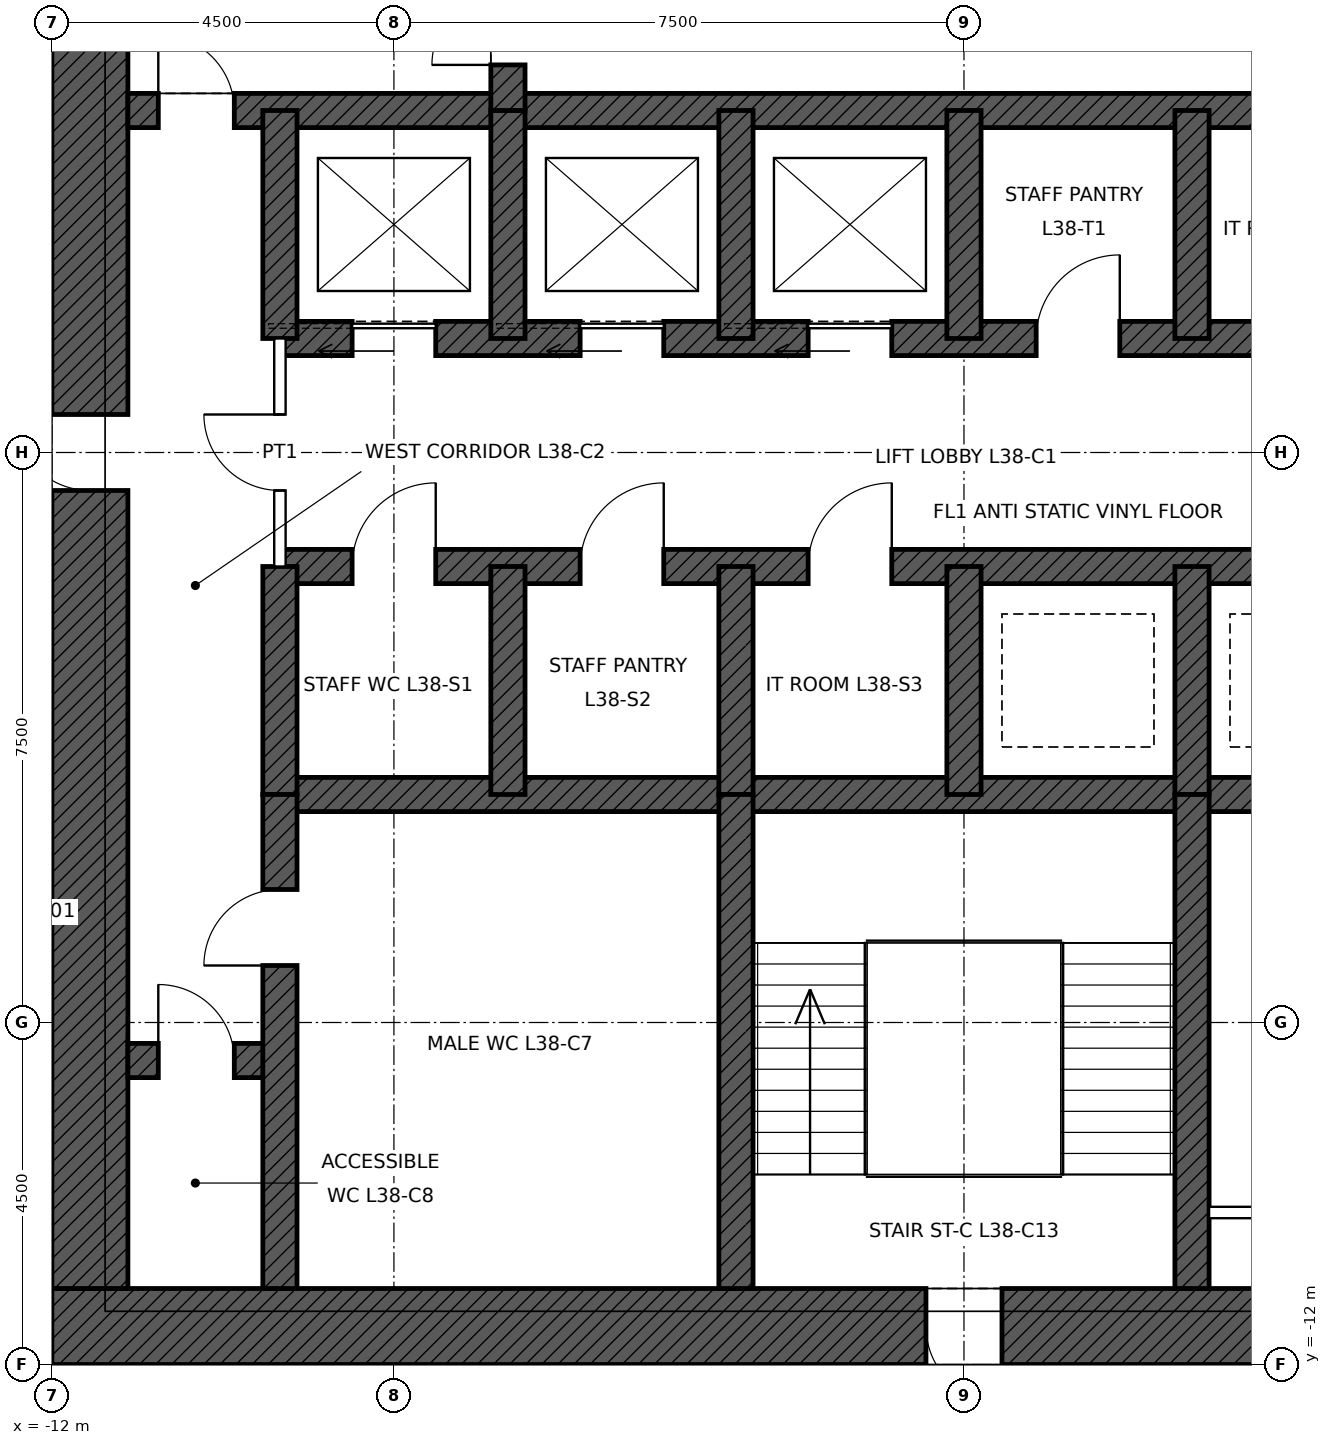
"""IFC4 building model, lengths in metres.
Left out: names, types, materials, properties, quantities, classifications, styles, units other than length and angle.
Written with IfcOpenShell. Run it as: python <this file> out.ifc"""

import sys

from ifc_helpers import new_model, si_unit, direction, frame, frame_2d, origin, place, context, subcontext, project, spatial, rectangle, extrude, element, fill, save


model = new_model("IFC4")
c1 = context("Model", 3, precision=1e-05, world=origin(), true_north=direction((0.0, 1.0)))
c2 = subcontext(c1, "Body", "Model", "MODEL_VIEW")
j1 = project(units=[si_unit("LENGTHUNIT", "METRE"), si_unit("PLANEANGLEUNIT", "RADIAN")], contexts=[c1])
p1 = place(None, origin())
s1 = spatial("IfcSite", under=j1, at=p1, CompositionType="ELEMENT")
p2 = place(p1, origin())
s2 = spatial("IfcBuilding", under=s1, at=p2, CompositionType="ELEMENT")
p3 = place(p2, frame((0.0, 0.0, 185.9)))
s3 = spatial("IfcBuildingStorey", under=s2, at=p3, CompositionType="ELEMENT", Elevation=185.9)
p4 = place(p3, frame((12.0, -11.5, 0.0), z_axis=(0.0, 0.0, 1.0), x_axis=(-1.0, 0.0, 0.0)))
e1 = element("IfcWall", 1, at=p4, inside=s3, PredefinedType="SHEAR", context=c2, shape_type="SweptSolid", body=[
    extrude(rectangle(XDim=24.0, YDim=1.0, at=frame_2d((12.0, 0.0))), origin(), (0.0, 0.0, 1.0), 4.0),
])
p5 = place(p4, frame((11.5, 0.0, 0.0)))
e2 = element("IfcOpeningElement", 2, at=p5, cuts=e1, PredefinedType="OPENING", context=c2, shape_type="SweptSolid", body=[
    extrude(rectangle(XDim=1.0, YDim=2.1, at=frame_2d((0.5, 1.05))), frame((0.0, 0.51, 0.0), z_axis=(0.0, -1.0, 0.0), x_axis=(1.0, 0.0, 0.0)), (0.0, 0.0, 1.0), 1.02),
])
p6 = place(p4, frame((1.0, 0.0, 0.0)))
e3 = element("IfcOpeningElement", 3, at=p6, cuts=e1, PredefinedType="OPENING", context=c2, shape_type="SweptSolid", body=[
    extrude(rectangle(XDim=1.0, YDim=2.4, at=frame_2d((0.5, 1.2))), frame((0.0, 0.51, 0.0), z_axis=(0.0, -1.0, 0.0), x_axis=(1.0, 0.0, 0.0)), (0.0, 0.0, 1.0), 1.02),
])
p7 = place(p3, frame((-11.5, -11.0, 0.0), z_axis=(0.0, 0.0, 1.0), x_axis=(0.0, 1.0, 0.0)))
e4 = element("IfcWall", 4, at=p7, inside=s3, PredefinedType="SHEAR", context=c2, shape_type="SweptSolid", body=[
    extrude(rectangle(XDim=22.0, YDim=1.0, at=frame_2d((11.0, 0.0))), origin(), (0.0, 0.0, 1.0), 4.0),
])
p8 = place(p7, frame((10.5, 0.0, 0.0)))
e5 = element("IfcOpeningElement", 5, at=p8, cuts=e4, PredefinedType="OPENING", context=c2, shape_type="SweptSolid", body=[
    extrude(rectangle(XDim=1.0, YDim=2.4, at=frame_2d((0.5, 1.2))), frame((0.0, 0.51, 0.0), z_axis=(0.0, -1.0, 0.0), x_axis=(1.0, 0.0, 0.0)), (0.0, 0.0, 1.0), 1.02),
])
p9 = place(p3, frame((-11.0, 4.5, 0.0), z_axis=(0.0, 0.0, 1.0), x_axis=(1.0, 0.0, 0.0)))
e6 = element("IfcWall", 6, at=p9, inside=s3, PredefinedType="SHEAR", context=c2, shape_type="SweptSolid", body=[
    extrude(rectangle(XDim=22.0, YDim=0.45, at=frame_2d((11.0, 0.0))), origin(), (0.0, 0.0, 1.0), 4.0),
])
p10 = place(p9, frame((0.4, 0.0, 0.0)))
e7 = element("IfcOpeningElement", 7, at=p10, cuts=e6, PredefinedType="OPENING", context=c2, shape_type="SweptSolid", body=[
    extrude(rectangle(XDim=1.0, YDim=2.1, at=frame_2d((0.5, 1.05))), frame((0.0, 0.235, 0.0), z_axis=(0.0, -1.0, 0.0), x_axis=(1.0, 0.0, 0.0)), (0.0, 0.0, 1.0), 0.47),
])
p11 = place(p9, frame((20.6, 0.0, 0.0)))
e8 = element("IfcOpeningElement", 8, at=p11, cuts=e6, PredefinedType="OPENING", context=c2, shape_type="SweptSolid", body=[
    extrude(rectangle(XDim=1.0, YDim=2.1, at=frame_2d((0.5, 1.05))), frame((0.0, 0.235, 0.0), z_axis=(0.0, -1.0, 0.0), x_axis=(1.0, 0.0, 0.0)), (0.0, 0.0, 1.0), 0.47),
])
p12 = place(p3, frame((-9.0, 1.5, 0.0), z_axis=(0.0, 0.0, 1.0), x_axis=(1.0, 0.0, 0.0)))
e9 = element("IfcWall", 9, at=p12, inside=s3, PredefinedType="SHEAR", context=c2, shape_type="SweptSolid", body=[
    extrude(rectangle(XDim=18.0, YDim=0.45, at=frame_2d((9.0, 0.0))), origin(), (0.0, 0.0, 1.0), 4.0),
])
p13 = place(p12, frame((0.95, 0.0, 0.0)))
e10 = element("IfcOpeningElement", 10, at=p13, cuts=e9, PredefinedType="OPENING", context=c2, shape_type="SweptSolid", body=[
    extrude(rectangle(XDim=1.1, YDim=2.1, at=frame_2d((0.55, 1.05))), frame((0.0, 0.235, 0.0), z_axis=(0.0, -1.0, 0.0), x_axis=(1.0, 0.0, 0.0)), (0.0, 0.0, 1.0), 0.47),
])
p14 = place(p12, frame((3.95, 0.0, 0.0)))
e11 = element("IfcOpeningElement", 11, at=p14, cuts=e9, PredefinedType="OPENING", context=c2, shape_type="SweptSolid", body=[
    extrude(rectangle(XDim=1.1, YDim=2.1, at=frame_2d((0.55, 1.05))), frame((0.0, 0.235, 0.0), z_axis=(0.0, -1.0, 0.0), x_axis=(1.0, 0.0, 0.0)), (0.0, 0.0, 1.0), 0.47),
])
p15 = place(p12, frame((6.95, 0.0, 0.0)))
e12 = element("IfcOpeningElement", 12, at=p15, cuts=e9, PredefinedType="OPENING", context=c2, shape_type="SweptSolid", body=[
    extrude(rectangle(XDim=1.1, YDim=2.1, at=frame_2d((0.55, 1.05))), frame((0.0, 0.235, 0.0), z_axis=(0.0, -1.0, 0.0), x_axis=(1.0, 0.0, 0.0)), (0.0, 0.0, 1.0), 0.47),
])
p16 = place(p12, frame((9.95, 0.0, 0.0)))
e13 = element("IfcOpeningElement", 13, at=p16, cuts=e9, PredefinedType="OPENING", context=c2, shape_type="SweptSolid", body=[
    extrude(rectangle(XDim=1.1, YDim=2.1, at=frame_2d((0.55, 1.05))), frame((0.0, 0.235, 0.0), z_axis=(0.0, -1.0, 0.0), x_axis=(1.0, 0.0, 0.0)), (0.0, 0.0, 1.0), 0.47),
])
p17 = place(p12, frame((12.95, 0.0, 0.0)))
e14 = element("IfcOpeningElement", 14, at=p17, cuts=e9, PredefinedType="OPENING", context=c2, shape_type="SweptSolid", body=[
    extrude(rectangle(XDim=1.1, YDim=2.1, at=frame_2d((0.55, 1.05))), frame((0.0, 0.235, 0.0), z_axis=(0.0, -1.0, 0.0), x_axis=(1.0, 0.0, 0.0)), (0.0, 0.0, 1.0), 0.47),
])
p18 = place(p12, frame((15.95, 0.0, 0.0)))
e15 = element("IfcOpeningElement", 15, at=p18, cuts=e9, PredefinedType="OPENING", context=c2, shape_type="SweptSolid", body=[
    extrude(rectangle(XDim=1.1, YDim=2.1, at=frame_2d((0.55, 1.05))), frame((0.0, 0.235, 0.0), z_axis=(0.0, -1.0, 0.0), x_axis=(1.0, 0.0, 0.0)), (0.0, 0.0, 1.0), 0.47),
])
p19 = place(p3, frame((-9.0, -1.5, 0.0), z_axis=(0.0, 0.0, 1.0), x_axis=(1.0, 0.0, 0.0)))
e16 = element("IfcWall", 16, at=p19, inside=s3, PredefinedType="SHEAR", context=c2, shape_type="SweptSolid", body=[
    extrude(rectangle(XDim=18.0, YDim=0.45, at=frame_2d((9.0, 0.0))), origin(), (0.0, 0.0, 1.0), 4.0),
])
p20 = place(p19, frame((0.95, 0.0, 0.0)))
e17 = element("IfcOpeningElement", 17, at=p20, cuts=e16, PredefinedType="OPENING", context=c2, shape_type="SweptSolid", body=[
    extrude(rectangle(XDim=1.1, YDim=2.1, at=frame_2d((0.55, 1.05))), frame((0.0, 0.235, 0.0), z_axis=(0.0, -1.0, 0.0), x_axis=(1.0, 0.0, 0.0)), (0.0, 0.0, 1.0), 0.47),
])
p21 = place(p19, frame((3.95, 0.0, 0.0)))
e18 = element("IfcOpeningElement", 18, at=p21, cuts=e16, PredefinedType="OPENING", context=c2, shape_type="SweptSolid", body=[
    extrude(rectangle(XDim=1.1, YDim=2.1, at=frame_2d((0.55, 1.05))), frame((0.0, 0.235, 0.0), z_axis=(0.0, -1.0, 0.0), x_axis=(1.0, 0.0, 0.0)), (0.0, 0.0, 1.0), 0.47),
])
p22 = place(p19, frame((6.95, 0.0, 0.0)))
e19 = element("IfcOpeningElement", 19, at=p22, cuts=e16, PredefinedType="OPENING", context=c2, shape_type="SweptSolid", body=[
    extrude(rectangle(XDim=1.1, YDim=2.1, at=frame_2d((0.55, 1.05))), frame((0.0, 0.235, 0.0), z_axis=(0.0, -1.0, 0.0), x_axis=(1.0, 0.0, 0.0)), (0.0, 0.0, 1.0), 0.47),
])
p23 = place(p3, frame((-9.0, -4.5, 0.0), z_axis=(0.0, 0.0, 1.0), x_axis=(1.0, 0.0, 0.0)))
e20 = element("IfcWall", 20, at=p23, inside=s3, PredefinedType="SHEAR", context=c2, shape_type="SweptSolid", body=[
    extrude(rectangle(XDim=18.0, YDim=0.45, at=frame_2d((9.0, 0.0))), origin(), (0.0, 0.0, 1.0), 4.0),
])
p24 = place(p3, frame((-11.0, -8.0, 0.0), z_axis=(0.0, 0.0, 1.0), x_axis=(1.0, 0.0, 0.0)))
e21 = element("IfcWall", 21, at=p24, inside=s3, PredefinedType="SHEAR", context=c2, shape_type="SweptSolid", body=[
    extrude(rectangle(XDim=2.0, YDim=0.45, at=frame_2d((1.0, 0.0))), origin(), (0.0, 0.0, 1.0), 4.0),
])
p25 = place(p24, frame((0.4, 0.0, 0.0)))
e22 = element("IfcOpeningElement", 22, at=p25, cuts=e21, PredefinedType="OPENING", context=c2, shape_type="SweptSolid", body=[
    extrude(rectangle(XDim=1.0, YDim=2.1, at=frame_2d((0.5, 1.05))), frame((0.0, 0.235, 0.0), z_axis=(0.0, -1.0, 0.0), x_axis=(1.0, 0.0, 0.0)), (0.0, 0.0, 1.0), 0.47),
])
for number, where, z_axis, x_axis in (
    (23, (-9.0, 1.5, 0.0), (0.0, 0.0, 1.0), (0.0, 1.0, 0.0)),
    (24, (-9.0, -4.5, 0.0), (0.0, 0.0, 1.0), (0.0, 1.0, 0.0)),
    (25, (-6.0, 1.5, 0.0), (0.0, 0.0, 1.0), (0.0, 1.0, 0.0)),
    (26, (-3.0, 1.5, 0.0), (0.0, 0.0, 1.0), (0.0, 1.0, 0.0)),
    (27, (0.0, 1.5, 0.0), (0.0, 0.0, 1.0), (0.0, 1.0, 0.0)),
    (28, (3.0, 1.5, 0.0), (0.0, 0.0, 1.0), (0.0, 1.0, 0.0)),
    (29, (-6.0, -4.5, 0.0), (0.0, 0.0, 1.0), (0.0, 1.0, 0.0)),
    (30, (-3.0, -4.5, 0.0), (0.0, 0.0, 1.0), (0.0, 1.0, 0.0)),
    (31, (0.0, -4.5, 0.0), (0.0, 0.0, 1.0), (0.0, 1.0, 0.0)),
    (32, (3.0, -4.5, 0.0), (0.0, 0.0, 1.0), (0.0, 1.0, 0.0)),
):
    element("IfcWall", number, at=place(p3, frame(where, z_axis=z_axis, x_axis=x_axis)), inside=s3, PredefinedType="SHEAR", context=c2, shape_type="SweptSolid", body=[
        extrude(rectangle(XDim=3.0, YDim=0.45, at=frame_2d((1.5, 0.0))), origin(), (0.0, 0.0, 1.0), 4.0),
    ])
p26 = place(p3, frame((-6.0, 4.5, 0.0), z_axis=(0.0, 0.0, 1.0), x_axis=(0.0, 1.0, 0.0)))
e33 = element("IfcWall", 33, at=p26, inside=s3, PredefinedType="SHEAR", context=c2, shape_type="SweptSolid", body=[
    extrude(rectangle(XDim=6.5, YDim=0.45, at=frame_2d((3.25, 0.0))), origin(), (0.0, 0.0, 1.0), 4.0),
])
p27 = place(p26, frame((0.6, 0.0, 0.0)))
e34 = element("IfcOpeningElement", 34, at=p27, cuts=e33, PredefinedType="OPENING", context=c2, shape_type="SweptSolid", body=[
    extrude(rectangle(XDim=1.0, YDim=2.1, at=frame_2d((0.5, 1.05))), frame((0.0, 0.235, 0.0), z_axis=(0.0, -1.0, 0.0), x_axis=(1.0, 0.0, 0.0)), (0.0, 0.0, 1.0), 0.47),
])
p28 = place(p3, frame((-9.0, -11.0, 0.0), z_axis=(0.0, 0.0, 1.0), x_axis=(0.0, 1.0, 0.0)))
e35 = element("IfcWall", 35, at=p28, inside=s3, PredefinedType="SHEAR", context=c2, shape_type="SweptSolid", body=[
    extrude(rectangle(XDim=6.5, YDim=0.45, at=frame_2d((3.25, 0.0))), origin(), (0.0, 0.0, 1.0), 4.0),
])
p29 = place(p28, frame((4.25, 0.0, 0.0)))
e36 = element("IfcOpeningElement", 36, at=p29, cuts=e35, PredefinedType="OPENING", context=c2, shape_type="SweptSolid", body=[
    extrude(rectangle(XDim=1.0, YDim=2.1, at=frame_2d((0.5, 1.05))), frame((0.0, 0.235, 0.0), z_axis=(0.0, -1.0, 0.0), x_axis=(1.0, 0.0, 0.0)), (0.0, 0.0, 1.0), 0.47),
])
for number, where, z_axis, x_axis in (
    (37, (-3.0, -11.0, 0.0), (0.0, 0.0, 1.0), (0.0, 1.0, 0.0)),
    (38, (3.0, -11.0, 0.0), (0.0, 0.0, 1.0), (0.0, 1.0, 0.0)),
):
    element("IfcWall", number, at=place(p3, frame(where, z_axis=z_axis, x_axis=x_axis)), inside=s3, PredefinedType="SHEAR", context=c2, shape_type="SweptSolid", body=[
        extrude(rectangle(XDim=6.5, YDim=0.45, at=frame_2d((3.25, 0.0))), origin(), (0.0, 0.0, 1.0), 4.0),
    ])
p30 = place(p3, frame((3.225, -10.0, 0.0), z_axis=(0.0, 0.0, 1.0), x_axis=(1.0, 0.0, 0.0)))
e39 = element("IfcWall", 39, at=p30, inside=s3, PredefinedType="PARTITIONING", context=c2, shape_type="SweptSolid", body=[
    extrude(rectangle(XDim=5.55, YDim=0.15, at=frame_2d((2.775, 0.0))), origin(), (0.0, 0.0, 1.0), 3.75),
])
p31 = place(p30, frame((2.275, 0.0, 0.0)))
e40 = element("IfcOpeningElement", 40, at=p31, cuts=e39, PredefinedType="OPENING", context=c2, shape_type="SweptSolid", body=[
    extrude(rectangle(XDim=1.0, YDim=2.1, at=frame_2d((0.5, 1.05))), frame((0.0, 0.085, 0.0), z_axis=(0.0, -1.0, 0.0), x_axis=(1.0, 0.0, 0.0)), (0.0, 0.0, 1.0), 0.17),
])
p32 = place(p3, frame((-9.0, -1.5, 0.0), z_axis=(0.0, 0.0, 1.0), x_axis=(0.0, 1.0, 0.0)))
e41 = element("IfcWall", 41, at=p32, inside=s3, PredefinedType="PARTITIONING", context=c2, shape_type="SweptSolid", body=[
    extrude(rectangle(XDim=3.0, YDim=0.15, at=frame_2d((1.5, 0.0))), origin(), (0.0, 0.0, 1.0), 3.75),
])
p33 = place(p32, frame((1.0, 0.0, 0.0)))
e42 = element("IfcOpeningElement", 42, at=p33, cuts=e41, PredefinedType="OPENING", context=c2, shape_type="SweptSolid", body=[
    extrude(rectangle(XDim=1.0, YDim=2.4, at=frame_2d((0.5, 1.2))), frame((0.0, 0.085, 0.0), z_axis=(0.0, -1.0, 0.0), x_axis=(1.0, 0.0, 0.0)), (0.0, 0.0, 1.0), 0.17),
])
p34 = place(p10, origin())
e43 = element("IfcDoor", 43, at=p34, inside=s3, OperationType="SINGLE_SWING_LEFT", PredefinedType="DOOR", context=c2, shape_type="SweptSolid", body=[
    extrude(rectangle(XDim=1.0, YDim=2.1, at=frame_2d((0.5, 1.05))), frame((0.0, 0.025, 0.0), z_axis=(0.0, -1.0, 0.0), x_axis=(1.0, 0.0, 0.0)), (0.0, 0.0, 1.0), 0.05),
])
fill(e7, e43)
p35 = place(p27, origin())
e44 = element("IfcDoor", 44, at=p35, inside=s3, OperationType="SINGLE_SWING_LEFT", PredefinedType="DOOR", context=c2, shape_type="SweptSolid", body=[
    extrude(rectangle(XDim=1.0, YDim=2.1, at=frame_2d((0.5, 1.05))), frame((0.0, 0.025, 0.0), z_axis=(0.0, -1.0, 0.0), x_axis=(1.0, 0.0, 0.0)), (0.0, 0.0, 1.0), 0.05),
])
fill(e34, e44)
p36 = place(p5, origin())
e45 = element("IfcDoor", 45, at=p36, inside=s3, OperationType="SINGLE_SWING_LEFT", PredefinedType="DOOR", context=c2, shape_type="SweptSolid", body=[
    extrude(rectangle(XDim=1.0, YDim=2.1, at=frame_2d((0.5, 1.05))), frame((0.0, 0.485, 0.0), z_axis=(0.0, -1.0, 0.0), x_axis=(1.0, 0.0, 0.0)), (0.0, 0.0, 1.0), 0.05),
])
fill(e2, e45)
p37 = place(p8, origin())
e46 = element("IfcDoor", 46, at=p37, inside=s3, OperationType="SINGLE_SWING_RIGHT", PredefinedType="DOOR", context=c2, shape_type="SweptSolid", body=[
    extrude(rectangle(XDim=1.0, YDim=2.4, at=frame_2d((0.5, 1.2))), frame((0.0, 0.485, 0.0), z_axis=(0.0, -1.0, 0.0), x_axis=(1.0, 0.0, 0.0)), (0.0, 0.0, 1.0), 0.05),
])
fill(e5, e46)
p38 = place(p29, origin())
e47 = element("IfcDoor", 47, at=p38, inside=s3, OperationType="SINGLE_SWING_LEFT", PredefinedType="DOOR", context=c2, shape_type="SweptSolid", body=[
    extrude(rectangle(XDim=1.0, YDim=2.1, at=frame_2d((0.5, 1.05))), frame((0.0, 0.025, 0.0), z_axis=(0.0, -1.0, 0.0), x_axis=(1.0, 0.0, 0.0)), (0.0, 0.0, 1.0), 0.05),
])
fill(e36, e47)
p39 = place(p25, origin())
e48 = element("IfcDoor", 48, at=p39, inside=s3, OperationType="SINGLE_SWING_LEFT", PredefinedType="DOOR", context=c2, shape_type="SweptSolid", body=[
    extrude(rectangle(XDim=1.0, YDim=2.1, at=frame_2d((0.5, 1.05))), frame((0.0, 0.025, 0.0), z_axis=(0.0, -1.0, 0.0), x_axis=(1.0, 0.0, 0.0)), (0.0, 0.0, 1.0), 0.05),
])
fill(e22, e48)
p40 = place(p13, origin())
e49 = element("IfcDoor", 49, at=p40, inside=s3, OperationType="SLIDING_TO_LEFT", PredefinedType="DOOR", context=c2, shape_type="SweptSolid", body=[
    extrude(rectangle(XDim=1.1, YDim=2.1, at=frame_2d((0.55, 1.05))), frame((0.0, 0.025, 0.0), z_axis=(0.0, -1.0, 0.0), x_axis=(1.0, 0.0, 0.0)), (0.0, 0.0, 1.0), 0.05),
])
fill(e10, e49)
p41 = place(p14, origin())
e50 = element("IfcDoor", 50, at=p41, inside=s3, OperationType="SLIDING_TO_LEFT", PredefinedType="DOOR", context=c2, shape_type="SweptSolid", body=[
    extrude(rectangle(XDim=1.1, YDim=2.1, at=frame_2d((0.55, 1.05))), frame((0.0, 0.025, 0.0), z_axis=(0.0, -1.0, 0.0), x_axis=(1.0, 0.0, 0.0)), (0.0, 0.0, 1.0), 0.05),
])
fill(e11, e50)
p42 = place(p15, origin())
e51 = element("IfcDoor", 51, at=p42, inside=s3, OperationType="SLIDING_TO_LEFT", PredefinedType="DOOR", context=c2, shape_type="SweptSolid", body=[
    extrude(rectangle(XDim=1.1, YDim=2.1, at=frame_2d((0.55, 1.05))), frame((0.0, 0.025, 0.0), z_axis=(0.0, -1.0, 0.0), x_axis=(1.0, 0.0, 0.0)), (0.0, 0.0, 1.0), 0.05),
])
fill(e12, e51)
p43 = place(p33, origin())
e52 = element("IfcDoor", 52, at=p43, inside=s3, OperationType="SINGLE_SWING_RIGHT", PredefinedType="DOOR", context=c2, shape_type="SweptSolid", body=[
    extrude(rectangle(XDim=1.0, YDim=2.4, at=frame_2d((0.5, 1.2))), frame((0.0, 0.025, 0.0), z_axis=(0.0, -1.0, 0.0), x_axis=(1.0, 0.0, 0.0)), (0.0, 0.0, 1.0), 0.05),
])
fill(e42, e52)
p44 = place(p16, origin())
e53 = element("IfcDoor", 53, at=p44, inside=s3, OperationType="SINGLE_SWING_RIGHT", PredefinedType="DOOR", context=c2, shape_type="SweptSolid", body=[
    extrude(rectangle(XDim=1.1, YDim=2.1, at=frame_2d((0.55, 1.05))), frame((0.0, 0.025, 0.0), z_axis=(0.0, -1.0, 0.0), x_axis=(1.0, 0.0, 0.0)), (0.0, 0.0, 1.0), 0.05),
])
fill(e13, e53)
p45 = place(p20, origin())
e54 = element("IfcDoor", 54, at=p45, inside=s3, OperationType="SINGLE_SWING_RIGHT", PredefinedType="DOOR", context=c2, shape_type="SweptSolid", body=[
    extrude(rectangle(XDim=1.1, YDim=2.1, at=frame_2d((0.55, 1.05))), frame((0.0, 0.025, 0.0), z_axis=(0.0, -1.0, 0.0), x_axis=(1.0, 0.0, 0.0)), (0.0, 0.0, 1.0), 0.05),
])
fill(e17, e54)
p46 = place(p21, origin())
e55 = element("IfcDoor", 55, at=p46, inside=s3, OperationType="SINGLE_SWING_RIGHT", PredefinedType="DOOR", context=c2, shape_type="SweptSolid", body=[
    extrude(rectangle(XDim=1.1, YDim=2.1, at=frame_2d((0.55, 1.05))), frame((0.0, 0.025, 0.0), z_axis=(0.0, -1.0, 0.0), x_axis=(1.0, 0.0, 0.0)), (0.0, 0.0, 1.0), 0.05),
])
fill(e18, e55)
p47 = place(p22, origin())
e56 = element("IfcDoor", 56, at=p47, inside=s3, OperationType="SINGLE_SWING_RIGHT", PredefinedType="DOOR", context=c2, shape_type="SweptSolid", body=[
    extrude(rectangle(XDim=1.1, YDim=2.1, at=frame_2d((0.55, 1.05))), frame((0.0, 0.025, 0.0), z_axis=(0.0, -1.0, 0.0), x_axis=(1.0, 0.0, 0.0)), (0.0, 0.0, 1.0), 0.05),
])
fill(e19, e56)
save(model, sys.argv[1])
